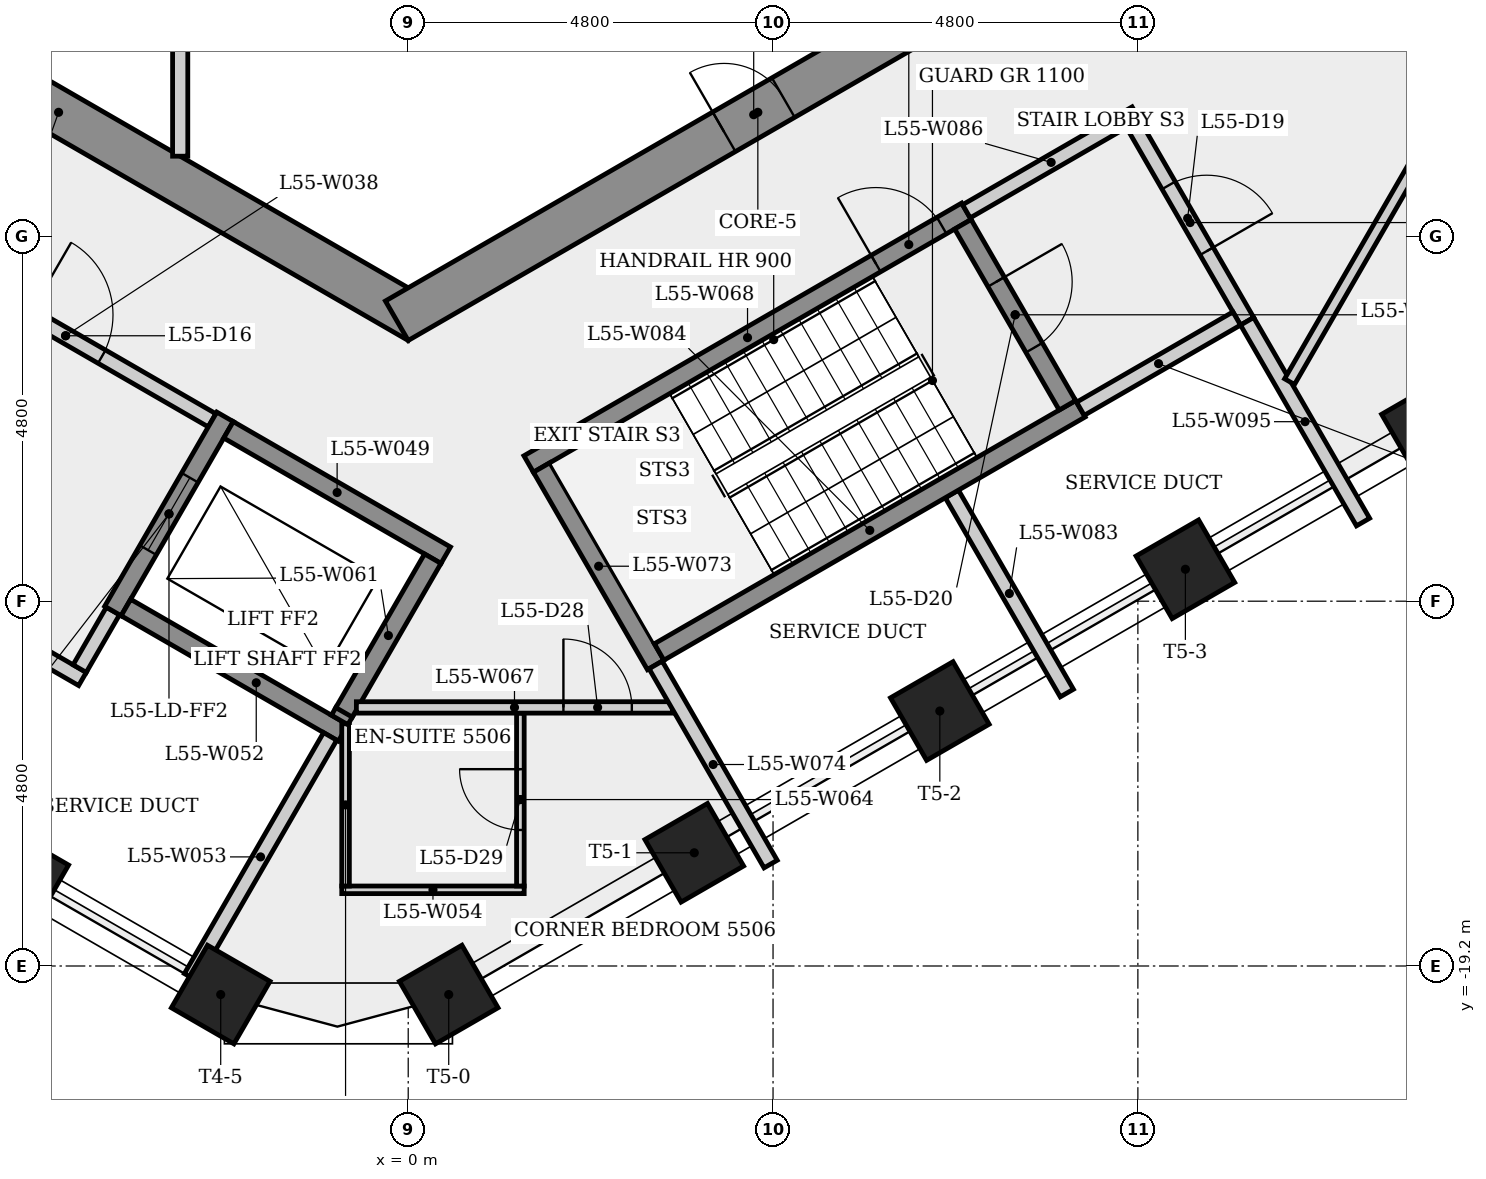
"""IFC4 building model, lengths in metres.
Left out: names, types, materials, properties, quantities, classifications, styles, units other than length and angle.
Written with IfcOpenShell. Run it as: python <this file> out.ifc"""

import sys

from ifc_helpers import new_model, si_unit, direction, frame, frame_2d, origin, origin_2d, place, context, subcontext, project, spatial, rectangle, extrude, element, fill, save


model = new_model("IFC4")
c1 = context("Model", 3, precision=1e-05, world=origin(), true_north=direction((0.0, 1.0)))
c2 = subcontext(c1, "Body", "Model", "MODEL_VIEW")
j1 = project(units=[si_unit("LENGTHUNIT", "METRE"), si_unit("PLANEANGLEUNIT", "RADIAN")], contexts=[c1])
p1 = place(None, origin())
s1 = spatial("IfcSite", under=j1, at=p1, CompositionType="ELEMENT")
p2 = place(p1, origin())
s2 = spatial("IfcBuilding", under=s1, at=p2, CompositionType="ELEMENT")
p3 = place(p2, frame((0.0, 0.0, 206.1)))
s3 = spatial("IfcBuildingStorey", under=s2, at=p3, CompositionType="ELEMENT", Elevation=206.1)
p4 = place(p3, frame((-9.35, -5.225, 0.0), z_axis=(0.0, 0.0, 1.0), x_axis=(0.866023993627, -0.500002442456, 0.0)))
e1 = element("IfcWall", 1, at=p4, inside=s3, PredefinedType="SHEAR", context=c2, shape_type="SweptSolid", body=[
    extrude(rectangle(XDim=10.97, YDim=0.6, at=frame_2d((5.485, 0.0))), origin(), (0.0, 0.0, 1.0), 4.0),
])
p5 = place(p4, frame((3.315, 0.0, 0.0)))
e2 = element("IfcOpeningElement", 2, at=p5, cuts=e1, PredefinedType="OPENING", context=c2, shape_type="SweptSolid", body=[
    extrude(rectangle(XDim=0.9, YDim=2.1, at=frame_2d((0.45, 1.05))), frame((0.0, 0.31, 0.0), z_axis=(0.0, -1.0, 0.0), x_axis=(1.0, 0.0, 0.0)), (0.0, 0.0, 1.0), 0.62),
])
p6 = place(p3, frame((-0.15, -10.71, 0.0), z_axis=(0.0, 0.0, 1.0), x_axis=(0.866023993627, 0.500002442456, 0.0)))
e3 = element("IfcWall", 3, at=p6, inside=s3, PredefinedType="SHEAR", context=c2, shape_type="SweptSolid", body=[
    extrude(rectangle(XDim=10.97, YDim=0.6, at=frame_2d((5.485, 0.0))), origin(), (0.0, 0.0, 1.0), 4.0),
])
p7 = place(p6, frame((4.972, 0.0, 0.0)))
e4 = element("IfcOpeningElement", 4, at=p7, cuts=e3, PredefinedType="OPENING", context=c2, shape_type="SweptSolid", body=[
    extrude(rectangle(XDim=0.9, YDim=2.1, at=frame_2d((0.45, 1.05))), frame((0.0, 0.31, 0.0), z_axis=(0.0, -1.0, 0.0), x_axis=(1.0, 0.0, 0.0)), (0.0, 0.0, 1.0), 0.62),
])
for number, where, z_axis, x_axis in (
    (5, (-5.117, -18.045, 0.0), (0.0, 0.0, 1.0), (-0.5, -0.866, 0.0)),
    (6, (-2.467, -19.576, 0.0), (0.0, 0.0, 1.0), (-0.5, -0.866, 0.0)),
    (7, (0.533, -19.576, 0.0), (0.0, 0.0, 1.0), (0.5, -0.866, 0.0)),
    (8, (3.764, -17.71, 0.0), (0.0, 0.0, 1.0), (0.5, -0.866, 0.0)),
    (9, (6.994, -15.845, 0.0), (0.0, 0.0, 1.0), (0.5, -0.866, 0.0)),
    (10, (10.225, -13.98, 0.0), (0.0, 0.0, 1.0), (0.5, -0.866, 0.0)),
    (11, (13.456, -12.115, 0.0), (0.0, 0.0, 1.0), (0.5, -0.866, 0.0)),
):
    element("IfcColumn", number, at=place(p3, frame(where, z_axis=z_axis, x_axis=x_axis)), inside=s3, PredefinedType="COLUMN", context=c2, shape_type="SweptSolid", body=[
        extrude(rectangle(XDim=0.95, YDim=0.95, at=origin_2d()), origin(), (0.0, 0.0, 1.0), 4.0),
    ])
p8 = place(p3, frame((-8.356, -13.073, 0.0), z_axis=(0.0, 0.0, 1.0), x_axis=(0.866038532462, -0.499977259774, 0.0)))
e12 = element("IfcWall", 12, at=p8, inside=s3, PredefinedType="PLUMBINGWALL", context=c2, shape_type="SweptSolid", body=[
    extrude(rectangle(XDim=4.7, YDim=0.2, at=frame_2d((2.35, 0.0))), origin(), (0.0, 0.0, 1.0), 3.6),
])
p9 = place(p3, frame((-6.435, -9.795, 0.0), z_axis=(0.0, 0.0, 1.0), x_axis=(0.866012907634, -0.500021643343, 0.0)))
e13 = element("IfcWall", 13, at=p9, inside=s3, PredefinedType="PARTITIONING", context=c2, shape_type="SweptSolid", body=[
    extrude(rectangle(XDim=4.45, YDim=0.2, at=frame_2d((2.225, 0.0))), origin(), (0.0, 0.0, 1.0), 3.6),
])
p10 = place(p9, frame((1.675, 0.0, 0.0)))
e14 = element("IfcOpeningElement", 14, at=p10, cuts=e13, PredefinedType="OPENING", context=c2, shape_type="SweptSolid", body=[
    extrude(rectangle(XDim=1.1, YDim=2.1, at=frame_2d((0.55, 1.05))), frame((0.0, 0.11, 0.0), z_axis=(0.0, -1.0, 0.0), x_axis=(1.0, 0.0, 0.0)), (0.0, 0.0, 1.0), 0.22),
])
p11 = place(p3, frame((-3.885, -14.529, 0.0), z_axis=(0.0, 0.0, 1.0), x_axis=(-0.499859285417, -0.866106630146, 0.0)))
e15 = element("IfcWall", 15, at=p11, inside=s3, PredefinedType="PLUMBINGWALL", context=c2, shape_type="SweptSolid", body=[
    extrude(rectangle(XDim=0.875, YDim=0.2, at=frame_2d((0.438, 0.0))), origin(), (0.0, 0.0, 1.0), 3.6),
])
p12 = place(p3, frame((-3.0, -8.545, 0.0), z_axis=(0.0, 0.0, 1.0), x_axis=(0.0, 1.0, 0.0)))
e16 = element("IfcWall", 16, at=p12, inside=s3, PredefinedType="PARTITIONING", context=c2, shape_type="SweptSolid", body=[
    extrude(rectangle(XDim=6.645, YDim=0.2, at=frame_2d((3.323, 0.0))), origin(), (0.0, 0.0, 1.0), 3.6),
])
p13 = place(p3, frame((-2.41, -11.974, 0.0), z_axis=(0.0, 0.0, 1.0), x_axis=(-0.500001826776, -0.866024349092, 0.0)))
e17 = element("IfcWall", 17, at=p13, inside=s3, PredefinedType="SHEAR", context=c2, shape_type="SweptSolid", body=[
    extrude(rectangle(XDim=2.95, YDim=0.25, at=frame_2d((1.475, 0.0))), origin(), (0.0, 0.0, 1.0), 3.6),
])
p14 = place(p13, frame((0.925, 0.0, 0.0)))
e18 = element("IfcOpeningElement", 18, at=p14, cuts=e17, PredefinedType="OPENING", context=c2, shape_type="SweptSolid", body=[
    extrude(rectangle(XDim=1.1, YDim=2.1, at=frame_2d((0.55, 1.05))), frame((0.0, 0.135, 0.0), z_axis=(0.0, -1.0, 0.0), x_axis=(1.0, 0.0, 0.0)), (0.0, 0.0, 1.0), 0.27),
])
p15 = place(p3, frame((-2.364, -12.145, 0.0), z_axis=(0.0, 0.0, 1.0), x_axis=(0.866040211805, -0.499974350878, 0.0)))
e19 = element("IfcWall", 19, at=p15, inside=s3, PredefinedType="SHEAR", context=c2, shape_type="SweptSolid", body=[
    extrude(rectangle(XDim=3.3, YDim=0.25, at=frame_2d((1.65, 0.0))), origin(), (0.0, 0.0, 1.0), 3.6),
])
p16 = place(p3, frame((-0.856, -16.133, 0.0), z_axis=(0.0, 0.0, 1.0), x_axis=(-0.866021716278, 0.500006386895, 0.0)))
e20 = element("IfcWall", 20, at=p16, inside=s3, PredefinedType="SHEAR", context=c2, shape_type="SweptSolid", body=[
    extrude(rectangle(XDim=3.3, YDim=0.25, at=frame_2d((1.65, 0.0))), origin(), (0.0, 0.0, 1.0), 3.6),
])
p17 = place(p3, frame((-1.027, -16.179, 0.0), z_axis=(0.0, 0.0, 1.0), x_axis=(-0.499989866495, -0.866031254287, 0.0)))
e21 = element("IfcWall", 21, at=p17, inside=s3, PredefinedType="PLUMBINGWALL", context=c2, shape_type="SweptSolid", body=[
    extrude(rectangle(XDim=3.662, YDim=0.2, at=frame_2d((1.831, 0.0))), origin(), (0.0, 0.0, 1.0), 3.6),
])
p18 = place(p3, frame((-0.874, -18.198, 0.0), z_axis=(0.0, 0.0, 1.0), x_axis=(1.0, 0.0, 0.0)))
e22 = element("IfcWall", 22, at=p18, inside=s3, PredefinedType="PARTITIONING", context=c2, shape_type="SweptSolid", body=[
    extrude(rectangle(XDim=2.4, YDim=0.1, at=frame_2d((1.2, 0.0))), origin(), (0.0, 0.0, 1.0), 3.6),
])
p19 = place(p3, frame((-0.824, -16.013, 0.0), z_axis=(0.0, 0.0, 1.0), x_axis=(0.0, -1.0, 0.0)))
e23 = element("IfcWall", 23, at=p19, inside=s3, PredefinedType="PARTITIONING", context=c2, shape_type="SweptSolid", body=[
    extrude(rectangle(XDim=2.135, YDim=0.1, at=frame_2d((1.067, 0.0))), origin(), (0.0, 0.0, 1.0), 3.6),
])
p20 = place(p3, frame((-0.839, -15.854, 0.0), z_axis=(0.0, 0.0, 1.0), x_axis=(-0.500730218626, -0.865603401191, 0.0)))
e24 = element("IfcWall", 24, at=p20, inside=s3, PredefinedType="SHEAR", context=c2, shape_type="SweptSolid", body=[
    extrude(rectangle(XDim=0.126, YDim=0.25, at=frame_2d((0.063, 0.0))), origin(), (0.0, 0.0, 1.0), 4.0),
])
p21 = place(p3, frame((0.323, -13.841, 0.0), z_axis=(0.0, 0.0, 1.0), x_axis=(-0.500030198396, -0.86600796803, 0.0)))
e25 = element("IfcWall", 25, at=p21, inside=s3, PredefinedType="SHEAR", context=c2, shape_type="SweptSolid", body=[
    extrude(rectangle(XDim=2.335, YDim=0.25, at=frame_2d((1.167, 0.0))), origin(), (0.0, 0.0, 1.0), 4.0),
])
p22 = place(p3, frame((1.476, -18.148, 0.0), z_axis=(0.0, 0.0, 1.0), x_axis=(0.0, 1.0, 0.0)))
e26 = element("IfcWall", 26, at=p22, inside=s3, PredefinedType="PARTITIONING", context=c2, shape_type="SweptSolid", body=[
    extrude(rectangle(XDim=2.275, YDim=0.1, at=frame_2d((1.137, 0.0))), origin(), (0.0, 0.0, 1.0), 3.6),
])
p23 = place(p22, frame((0.738, 0.0, 0.0)))
e27 = element("IfcOpeningElement", 27, at=p23, cuts=e26, PredefinedType="OPENING", context=c2, shape_type="SweptSolid", body=[
    extrude(rectangle(XDim=0.8, YDim=2.1, at=frame_2d((0.4, 1.05))), frame((0.0, 0.06, 0.0), z_axis=(0.0, -1.0, 0.0), x_axis=(1.0, 0.0, 0.0)), (0.0, 0.0, 1.0), 0.12),
])
p24 = place(p3, frame((-0.682, -15.798, 0.0), z_axis=(0.0, 0.0, 1.0), x_axis=(1.0, 0.0, 0.0)))
e28 = element("IfcWall", 28, at=p24, inside=s3, PredefinedType="PARTITIONING", context=c2, shape_type="SweptSolid", body=[
    extrude(rectangle(XDim=4.16, YDim=0.15, at=frame_2d((2.08, 0.0))), origin(), (0.0, 0.0, 1.0), 3.6),
])
p25 = place(p24, frame((2.724, 0.0, 0.0)))
e29 = element("IfcOpeningElement", 29, at=p25, cuts=e28, PredefinedType="OPENING", context=c2, shape_type="SweptSolid", body=[
    extrude(rectangle(XDim=0.9, YDim=2.1, at=frame_2d((0.45, 1.05))), frame((0.0, 0.085, 0.0), z_axis=(0.0, -1.0, 0.0), x_axis=(1.0, 0.0, 0.0)), (0.0, 0.0, 1.0), 0.17),
])
p26 = place(p3, frame((1.585, -12.595, 0.0), z_axis=(0.0, 0.0, 1.0), x_axis=(0.866036417653, 0.499980922934, 0.0)))
e30 = element("IfcWall", 30, at=p26, inside=s3, PredefinedType="SHEAR", context=c2, shape_type="SweptSolid", body=[
    extrude(rectangle(XDim=6.65, YDim=0.25, at=frame_2d((3.325, 0.0))), origin(), (0.0, 0.0, 1.0), 3.6),
])
p27 = place(p26, frame((5.275, 0.0, 0.0)))
e31 = element("IfcOpeningElement", 31, at=p27, cuts=e30, PredefinedType="OPENING", context=c2, shape_type="SweptSolid", body=[
    extrude(rectangle(XDim=1.0, YDim=2.1, at=frame_2d((0.5, 1.05))), frame((0.0, 0.135, 0.0), z_axis=(0.0, -1.0, 0.0), x_axis=(1.0, 0.0, 0.0)), (0.0, 0.0, 1.0), 0.27),
])
p28 = place(p3, frame((3.256, -15.239, 0.0), z_axis=(0.0, 0.0, 1.0), x_axis=(-0.50002537861, 0.866010750942, 0.0)))
e32 = element("IfcWall", 32, at=p28, inside=s3, PredefinedType="SHEAR", context=c2, shape_type="SweptSolid", body=[
    extrude(rectangle(XDim=3.0, YDim=0.25, at=frame_2d((1.5, 0.0))), origin(), (0.0, 0.0, 1.0), 3.6),
])
for number, where, z_axis, x_axis in (
    (33, (3.256, -15.239, 0.0), (0.0, 0.0, 1.0), (0.5, -0.866, 0.0)),
    (34, (7.153, -12.989, 0.0), (0.0, 0.0, 1.0), (0.5, -0.866, 0.0)),
):
    element("IfcWall", number, at=place(p3, frame(where, z_axis=z_axis, x_axis=x_axis)), inside=s3, PredefinedType="PLUMBINGWALL", context=c2, shape_type="SweptSolid", body=[
        extrude(rectangle(XDim=3.025, YDim=0.2, at=frame_2d((1.513, 0.0))), origin(), (0.0, 0.0, 1.0), 3.6),
    ])
p29 = place(p3, frame((3.301, -15.068, 0.0), z_axis=(0.0, 0.0, 1.0), x_axis=(0.866035036182, 0.499983315828, 0.0)))
e35 = element("IfcWall", 35, at=p29, inside=s3, PredefinedType="SHEAR", context=c2, shape_type="SweptSolid", body=[
    extrude(rectangle(XDim=6.4, YDim=0.25, at=frame_2d((3.2, 0.0))), origin(), (0.0, 0.0, 1.0), 4.0),
])
p30 = place(p3, frame((7.298, -9.441, 0.0), z_axis=(0.0, 0.0, 1.0), x_axis=(0.500034990121, -0.866005201286, 0.0)))
e36 = element("IfcWall", 36, at=p30, inside=s3, PredefinedType="SHEAR", context=c2, shape_type="SweptSolid", body=[
    extrude(rectangle(XDim=2.75, YDim=0.25, at=frame_2d((1.375, 0.0))), origin(), (0.0, 0.0, 1.0), 3.6),
])
p31 = place(p30, frame((0.875, 0.0, 0.0)))
e37 = element("IfcOpeningElement", 37, at=p31, cuts=e36, PredefinedType="OPENING", context=c2, shape_type="SweptSolid", body=[
    extrude(rectangle(XDim=1.0, YDim=2.1, at=frame_2d((0.5, 1.05))), frame((0.0, 0.135, 0.0), z_axis=(0.0, -1.0, 0.0), x_axis=(1.0, 0.0, 0.0)), (0.0, 0.0, 1.0), 0.27),
])
p32 = place(p3, frame((7.344, -9.27, 0.0), z_axis=(0.0, 0.0, 1.0), x_axis=(0.866005588531, 0.500034319456, 0.0)))
e38 = element("IfcWall", 38, at=p32, inside=s3, PredefinedType="PARTITIONING", context=c2, shape_type="SweptSolid", body=[
    extrude(rectangle(XDim=2.575, YDim=0.2, at=frame_2d((1.288, 0.0))), origin(), (0.0, 0.0, 1.0), 3.6),
])
p33 = place(p3, frame((9.537, -8.119, 0.0), z_axis=(0.0, 0.0, 1.0), x_axis=(0.499990139034, -0.866031096941, 0.0)))
e39 = element("IfcWall", 39, at=p33, inside=s3, PredefinedType="PARTITIONING", context=c2, shape_type="SweptSolid", body=[
    extrude(rectangle(XDim=3.0, YDim=0.2, at=frame_2d((1.5, 0.0))), origin(), (0.0, 0.0, 1.0), 3.6),
])
p34 = place(p33, frame((0.935, 0.0, 0.0)))
e40 = element("IfcOpeningElement", 40, at=p34, cuts=e39, PredefinedType="OPENING", context=c2, shape_type="SweptSolid", body=[
    extrude(rectangle(XDim=1.0, YDim=2.1, at=frame_2d((0.5, 1.05))), frame((0.0, 0.11, 0.0), z_axis=(0.0, -1.0, 0.0), x_axis=(1.0, 0.0, 0.0)), (0.0, 0.0, 1.0), 0.22),
])
p35 = place(p3, frame((11.037, -10.717, 0.0), z_axis=(0.0, 0.0, 1.0), x_axis=(0.500004207291, -0.86602297469, 0.0)))
e41 = element("IfcWall", 41, at=p35, inside=s3, PredefinedType="PLUMBINGWALL", context=c2, shape_type="SweptSolid", body=[
    extrude(rectangle(XDim=3.05, YDim=0.2, at=frame_2d((1.525, 0.0))), origin(), (0.0, 0.0, 1.0), 3.6),
])
p36 = place(p3, frame((10.901, -10.681, 0.0), z_axis=(0.0, 0.0, 1.0), x_axis=(-0.866007538022, -0.500030943131, 0.0)))
e42 = element("IfcWall", 42, at=p36, inside=s3, PredefinedType="PLUMBINGWALL", context=c2, shape_type="SweptSolid", body=[
    extrude(rectangle(XDim=2.375, YDim=0.2, at=frame_2d((1.188, 0.0))), origin(), (0.0, 0.0, 1.0), 3.6),
])
p37 = place(p3, frame((15.54, -4.68, 0.0), z_axis=(0.0, 0.0, 1.0), x_axis=(-0.500017165488, -0.866015493058, 0.0)))
e43 = element("IfcWall", 43, at=p37, inside=s3, PredefinedType="PARTITIONING", context=c2, shape_type="SweptSolid", body=[
    extrude(rectangle(XDim=7.888, YDim=0.15, at=frame_2d((3.944, 0.0))), origin(), (0.0, 0.0, 1.0), 3.6),
])
p38 = place(p37, frame((3.444, 0.0, 0.0)))
e44 = element("IfcOpeningElement", 44, at=p38, cuts=e43, PredefinedType="OPENING", context=c2, shape_type="SweptSolid", body=[
    extrude(rectangle(XDim=1.0, YDim=2.1, at=frame_2d((0.5, 1.05))), frame((0.0, 0.085, 0.0), z_axis=(0.0, -1.0, 0.0), x_axis=(1.0, 0.0, 0.0)), (0.0, 0.0, 1.0), 0.17),
])
p39 = place(p10, origin())
e45 = element("IfcDoor", 45, at=p39, inside=s3, OperationType="SINGLE_SWING_LEFT", PredefinedType="DOOR", context=c2, shape_type="SweptSolid", body=[
    extrude(rectangle(XDim=1.1, YDim=2.1, at=frame_2d((0.55, 1.05))), frame((0.0, 0.025, 0.0), z_axis=(0.0, -1.0, 0.0), x_axis=(1.0, 0.0, 0.0)), (0.0, 0.0, 1.0), 0.05),
])
fill(e14, e45)
p40 = place(p14, origin())
e46 = element("IfcDoor", 46, at=p40, inside=s3, OperationType="SLIDING_TO_LEFT", PredefinedType="DOOR", context=c2, shape_type="SweptSolid", body=[
    extrude(rectangle(XDim=1.1, YDim=2.1, at=frame_2d((0.55, 1.05))), frame((0.0, 0.025, 0.0), z_axis=(0.0, -1.0, 0.0), x_axis=(1.0, 0.0, 0.0)), (0.0, 0.0, 1.0), 0.05),
])
fill(e18, e46)
p41 = place(p27, origin())
e47 = element("IfcDoor", 47, at=p41, inside=s3, OperationType="SINGLE_SWING_LEFT", PredefinedType="DOOR", context=c2, shape_type="SweptSolid", body=[
    extrude(rectangle(XDim=1.0, YDim=2.1, at=frame_2d((0.5, 1.05))), frame((0.0, 0.025, 0.0), z_axis=(0.0, -1.0, 0.0), x_axis=(1.0, 0.0, 0.0)), (0.0, 0.0, 1.0), 0.05),
])
fill(e31, e47)
p42 = place(p34, origin())
e48 = element("IfcDoor", 48, at=p42, inside=s3, OperationType="SINGLE_SWING_RIGHT", PredefinedType="DOOR", context=c2, shape_type="SweptSolid", body=[
    extrude(rectangle(XDim=1.0, YDim=2.1, at=frame_2d((0.5, 1.05))), frame((0.0, 0.025, 0.0), z_axis=(0.0, -1.0, 0.0), x_axis=(1.0, 0.0, 0.0)), (0.0, 0.0, 1.0), 0.05),
])
fill(e40, e48)
p43 = place(p31, origin())
e49 = element("IfcDoor", 49, at=p43, inside=s3, OperationType="SINGLE_SWING_LEFT", PredefinedType="DOOR", context=c2, shape_type="SweptSolid", body=[
    extrude(rectangle(XDim=1.0, YDim=2.1, at=frame_2d((0.5, 1.05))), frame((0.0, 0.025, 0.0), z_axis=(0.0, -1.0, 0.0), x_axis=(1.0, 0.0, 0.0)), (0.0, 0.0, 1.0), 0.05),
])
fill(e37, e49)
p44 = place(p25, origin())
e50 = element("IfcDoor", 50, at=p44, inside=s3, OperationType="SINGLE_SWING_LEFT", PredefinedType="DOOR", context=c2, shape_type="SweptSolid", body=[
    extrude(rectangle(XDim=0.9, YDim=2.1, at=frame_2d((0.45, 1.05))), frame((0.0, 0.025, 0.0), z_axis=(0.0, -1.0, 0.0), x_axis=(1.0, 0.0, 0.0)), (0.0, 0.0, 1.0), 0.05),
])
fill(e29, e50)
p45 = place(p23, origin())
e51 = element("IfcDoor", 51, at=p45, inside=s3, OperationType="SINGLE_SWING_RIGHT", PredefinedType="DOOR", context=c2, shape_type="SweptSolid", body=[
    extrude(rectangle(XDim=0.8, YDim=2.1, at=frame_2d((0.4, 1.05))), frame((0.0, 0.025, 0.0), z_axis=(0.0, -1.0, 0.0), x_axis=(1.0, 0.0, 0.0)), (0.0, 0.0, 1.0), 0.05),
])
fill(e27, e51)
p46 = place(p7, origin())
e52 = element("IfcDoor", 52, at=p46, inside=s3, OperationType="SINGLE_SWING_LEFT", PredefinedType="DOOR", context=c2, shape_type="SweptSolid", body=[
    extrude(rectangle(XDim=0.9, YDim=2.1, at=frame_2d((0.45, 1.05))), frame((0.0, 0.025, 0.0), z_axis=(0.0, -1.0, 0.0), x_axis=(1.0, 0.0, 0.0)), (0.0, 0.0, 1.0), 0.05),
])
fill(e4, e52)
save(model, sys.argv[1])
